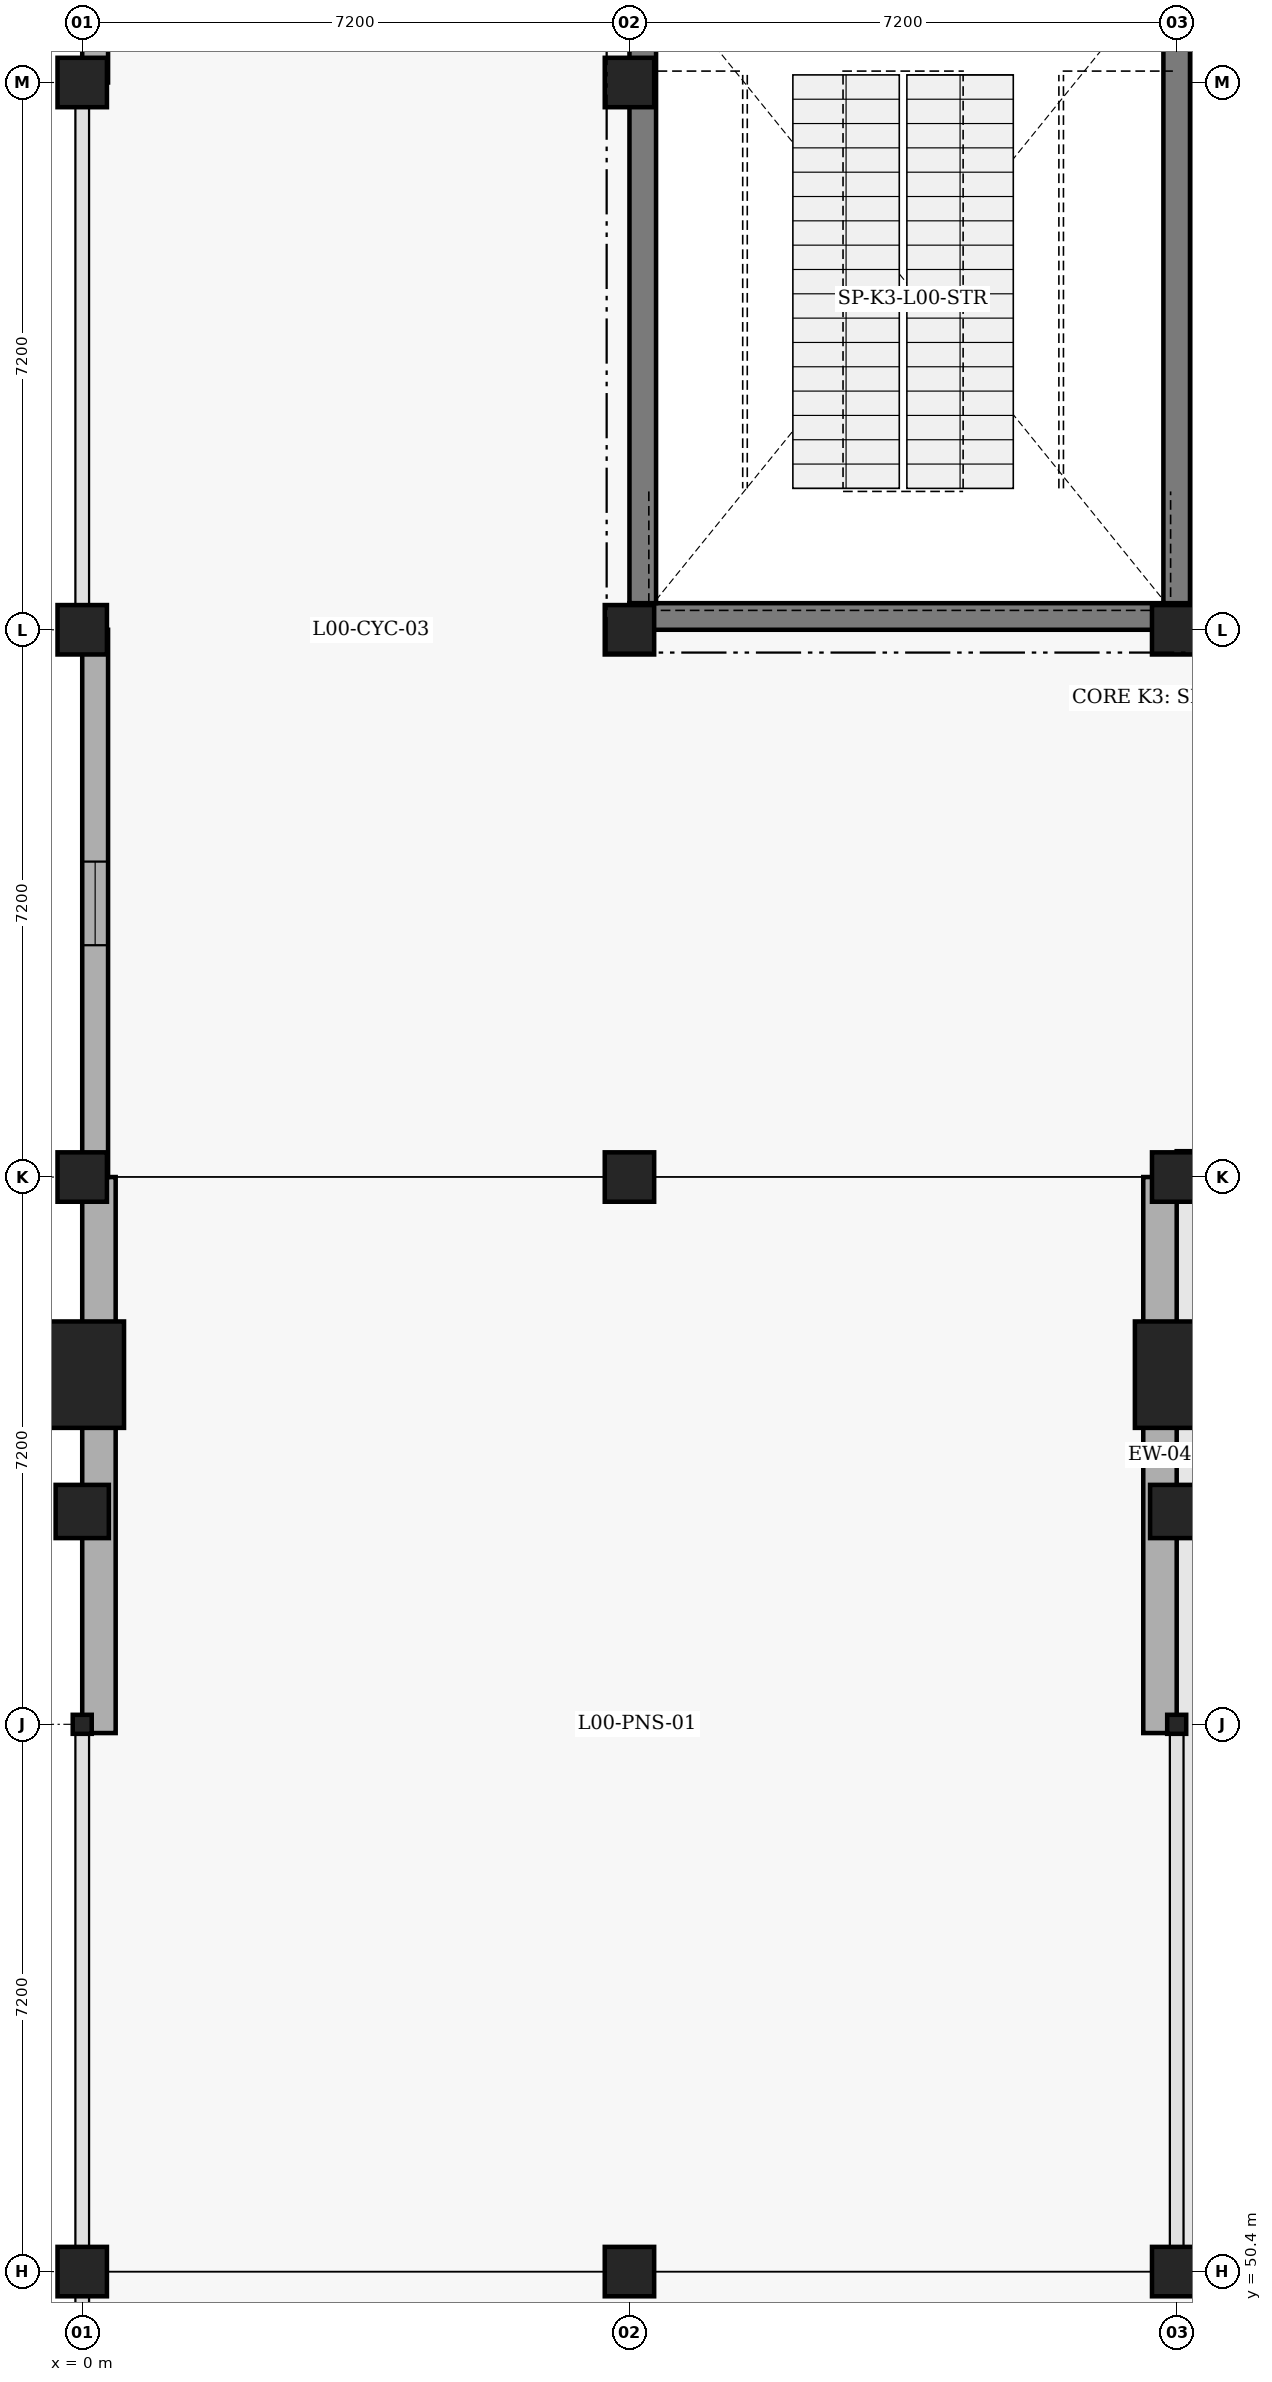
"""IFC4 building model, lengths in metres.
Left out: names, types, materials, properties, quantities, classifications, styles, units other than length and angle.
Written with IfcOpenShell. Run it as: python <this file> out.ifc"""

import sys

from ifc_helpers import new_model, si_unit, direction, frame, frame_2d, origin, origin_2d, place, context, subcontext, project, spatial, rectangle, hollow_rectangle, circle, extrude, element, fill, save


model = new_model("IFC4")
c1 = context("Model", 3, precision=1e-05, world=origin(), true_north=direction((0.0, 1.0)))
c2 = subcontext(c1, "Body", "Model", "MODEL_VIEW")
j1 = project(units=[si_unit("LENGTHUNIT", "METRE"), si_unit("PLANEANGLEUNIT", "RADIAN")], contexts=[c1])
p1 = place(None, origin())
s1 = spatial("IfcSite", under=j1, at=p1, CompositionType="ELEMENT")
p2 = place(p1, origin())
s2 = spatial("IfcBuilding", under=s1, at=p2, CompositionType="ELEMENT")
p3 = place(p2, origin())
s3 = spatial("IfcBuildingStorey", under=s2, at=p3, CompositionType="ELEMENT", Elevation=0.0)
p4 = place(p3, frame((21.6, 72.175, 0.0), z_axis=(0.0, 0.0, 1.0), x_axis=(-1.0, 0.0, 0.0)))
e1 = element("IfcWall", 1, at=p4, inside=s3, PredefinedType="SHEAR", context=c2, shape_type="SweptSolid", body=[
    extrude(rectangle(XDim=14.4, YDim=0.35, at=frame_2d((7.2, 0.0))), origin(), (0.0, 0.0, 1.0), 5.4),
])
p5 = place(p3, frame((7.375, 72.35, 0.0), z_axis=(0.0, 0.0, 1.0), x_axis=(0.0, 1.0, 0.0)))
e2 = element("IfcWall", 2, at=p5, inside=s3, PredefinedType="SHEAR", context=c2, shape_type="SweptSolid", body=[
    extrude(rectangle(XDim=13.7, YDim=0.35, at=frame_2d((6.85, 0.0))), origin(), (0.0, 0.0, 1.0), 5.4),
])
p6 = place(p5, frame((9.8, 0.0, 0.0)))
e3 = element("IfcOpeningElement", 3, at=p6, cuts=e2, PredefinedType="OPENING", context=c2, shape_type="SweptSolid", body=[
    extrude(rectangle(XDim=1.25, YDim=2.2, at=frame_2d((0.625, 1.1))), frame((0.0, 0.185, 0.0), z_axis=(0.0, -1.0, 0.0), x_axis=(1.0, 0.0, 0.0)), (0.0, 0.0, 1.0), 0.37),
])
p7 = place(p3, frame((14.4, 86.05, 0.0), z_axis=(0.0, 0.0, 1.0), x_axis=(0.0, -1.0, 0.0)))
e4 = element("IfcWall", 4, at=p7, inside=s3, PredefinedType="SHEAR", context=c2, shape_type="SweptSolid", body=[
    extrude(rectangle(XDim=13.7, YDim=0.35, at=frame_2d((6.85, 0.0))), origin(), (0.0, 0.0, 1.0), 5.4),
])
p8 = place(p7, frame((1.5, 0.0, 0.0)))
e5 = element("IfcOpeningElement", 5, at=p8, cuts=e4, PredefinedType="OPENING", context=c2, shape_type="SweptSolid", body=[
    extrude(rectangle(XDim=1.25, YDim=2.2, at=frame_2d((0.625, 1.1))), frame((0.0, 0.185, 0.0), z_axis=(0.0, -1.0, 0.0), x_axis=(1.0, 0.0, 0.0)), (0.0, 0.0, 1.0), 0.37),
])
p9 = place(p3, frame((0.0, 50.4, 0.0), z_axis=(0.0, 0.0, 1.0), x_axis=(1.0, 0.0, 0.0)))
e6 = element("IfcColumn", 6, at=p9, inside=s3, PredefinedType="COLUMN", context=c2, shape_type="SweptSolid", body=[
    extrude(rectangle(XDim=0.65, YDim=0.65, at=origin_2d()), origin(), (0.0, 0.0, 1.0), 5.4),
])
p10 = place(p3, frame((0.0, 57.6, 0.0), z_axis=(0.0, 0.0, 1.0), x_axis=(1.0, 0.0, 0.0)))
e7 = element("IfcColumn", 7, at=p10, inside=s3, PredefinedType="COLUMN", context=c2, shape_type="SweptSolid", body=[
    extrude(hollow_rectangle(XDim=0.25, YDim=0.25, WallThickness=0.012, at=origin_2d()), origin(), (0.0, 0.0, 1.0), 5.16),
])
p11 = place(p3, frame((0.0, 60.4, 0.0), z_axis=(0.0, 0.0, 1.0), x_axis=(1.0, 0.0, 0.0)))
e8 = element("IfcColumn", 8, at=p11, inside=s3, PredefinedType="COLUMN", context=c2, shape_type="SweptSolid", body=[
    extrude(circle(Radius=0.35, at=origin_2d()), origin(), (0.0, 0.0, 1.0), 5.4),
])
p12 = place(p3, frame((0.0, 62.2, 0.0), z_axis=(0.0, 0.0, 1.0), x_axis=(1.0, 0.0, 0.0)))
e9 = element("IfcColumn", 9, at=p12, inside=s3, PredefinedType="COLUMN", context=c2, shape_type="SweptSolid", body=[
    extrude(rectangle(XDim=1.1, YDim=1.4, at=origin_2d()), origin(), (0.0, 0.0, 1.0), 1.5),
])
for number, where, z_axis, x_axis in (
    (10, (0.0, 64.8, 0.0), (0.0, 0.0, 1.0), (1.0, 0.0, 0.0)),
    (11, (0.0, 72.0, 0.0), (0.0, 0.0, 1.0), (0.0, 1.0, 0.0)),
    (12, (0.0, 79.2, 0.0), (0.0, 0.0, 1.0), (0.0, 1.0, 0.0)),
):
    element("IfcColumn", number, at=place(p3, frame(where, z_axis=z_axis, x_axis=x_axis)), inside=s3, PredefinedType="COLUMN", context=c2, shape_type="SweptSolid", body=[
        extrude(rectangle(XDim=0.65, YDim=0.65, at=origin_2d()), origin(), (0.0, 0.0, 1.0), 5.12),
    ])
p13 = place(p3, frame((7.2, 50.4, 0.0), z_axis=(0.0, 0.0, 1.0), x_axis=(1.0, 0.0, 0.0)))
e13 = element("IfcColumn", 13, at=p13, inside=s3, PredefinedType="COLUMN", context=c2, shape_type="SweptSolid", body=[
    extrude(rectangle(XDim=0.65, YDim=0.65, at=origin_2d()), origin(), (0.0, 0.0, 1.0), 5.4),
])
p14 = place(p3, frame((7.2, 57.6, 0.0), z_axis=(0.0, 0.0, 1.0), x_axis=(1.0, 0.0, 0.0)))
e14 = element("IfcColumn", 14, at=p14, inside=s3, PredefinedType="COLUMN", context=c2, shape_type="SweptSolid", body=[
    extrude(hollow_rectangle(XDim=0.25, YDim=0.25, WallThickness=0.012, at=origin_2d()), origin(), (0.0, 0.0, 1.0), 5.16),
])
for number, where, z_axis, x_axis in (
    (15, (7.2, 64.8, 0.0), (0.0, 0.0, 1.0), (1.0, 0.0, 0.0)),
    (16, (7.2, 72.0, 0.0), (0.0, 0.0, 1.0), (1.0, 0.0, 0.0)),
    (17, (7.2, 79.2, 0.0), (0.0, 0.0, 1.0), (1.0, 0.0, 0.0)),
):
    element("IfcColumn", number, at=place(p3, frame(where, z_axis=z_axis, x_axis=x_axis)), inside=s3, PredefinedType="COLUMN", context=c2, shape_type="SweptSolid", body=[
        extrude(rectangle(XDim=0.65, YDim=0.65, at=origin_2d()), origin(), (0.0, 0.0, 1.0), 5.12),
    ])
p15 = place(p3, frame((14.4, 50.4, 0.0), z_axis=(0.0, 0.0, 1.0), x_axis=(1.0, 0.0, 0.0)))
e18 = element("IfcColumn", 18, at=p15, inside=s3, PredefinedType="COLUMN", context=c2, shape_type="SweptSolid", body=[
    extrude(rectangle(XDim=0.65, YDim=0.65, at=origin_2d()), origin(), (0.0, 0.0, 1.0), 5.4),
])
p16 = place(p3, frame((14.4, 57.6, 0.0), z_axis=(0.0, 0.0, 1.0), x_axis=(1.0, 0.0, 0.0)))
e19 = element("IfcColumn", 19, at=p16, inside=s3, PredefinedType="COLUMN", context=c2, shape_type="SweptSolid", body=[
    extrude(hollow_rectangle(XDim=0.25, YDim=0.25, WallThickness=0.012, at=origin_2d()), origin(), (0.0, 0.0, 1.0), 5.16),
])
p17 = place(p3, frame((14.4, 60.4, 0.0), z_axis=(0.0, 0.0, 1.0), x_axis=(1.0, 0.0, 0.0)))
e20 = element("IfcColumn", 20, at=p17, inside=s3, PredefinedType="COLUMN", context=c2, shape_type="SweptSolid", body=[
    extrude(circle(Radius=0.35, at=origin_2d()), origin(), (0.0, 0.0, 1.0), 5.4),
])
p18 = place(p3, frame((14.4, 62.2, 0.0), z_axis=(0.0, 0.0, 1.0), x_axis=(1.0, 0.0, 0.0)))
e21 = element("IfcColumn", 21, at=p18, inside=s3, PredefinedType="COLUMN", context=c2, shape_type="SweptSolid", body=[
    extrude(rectangle(XDim=1.1, YDim=1.4, at=origin_2d()), origin(), (0.0, 0.0, 1.0), 1.5),
])
for number, where, z_axis, x_axis in (
    (22, (14.4, 64.8, 0.0), (0.0, 0.0, 1.0), (1.0, 0.0, 0.0)),
    (23, (14.4, 72.0, 0.0), (0.0, 0.0, 1.0), (1.0, 0.0, 0.0)),
):
    element("IfcColumn", number, at=place(p3, frame(where, z_axis=z_axis, x_axis=x_axis)), inside=s3, PredefinedType="COLUMN", context=c2, shape_type="SweptSolid", body=[
        extrude(rectangle(XDim=0.65, YDim=0.65, at=origin_2d()), origin(), (0.0, 0.0, 1.0), 5.12),
    ])
p19 = place(p3, frame((0.22, 57.485, 0.0), z_axis=(0.0, 0.0, 1.0), x_axis=(0.0, 1.0, 0.0)))
e24 = element("IfcWall", 24, at=p19, inside=s3, PredefinedType="SOLIDWALL", context=c2, shape_type="SweptSolid", body=[
    extrude(rectangle(XDim=7.315, YDim=0.44, at=frame_2d((3.657, 0.0))), origin(), (0.0, 0.0, 1.0), 4.83),
])
p20 = place(p3, frame((0.17, 64.8, 0.0), z_axis=(0.0, 0.0, 1.0), x_axis=(0.0, 1.0, 0.0)))
e25 = element("IfcWall", 25, at=p20, inside=s3, PredefinedType="SOLIDWALL", context=c2, shape_type="SweptSolid", body=[
    extrude(rectangle(XDim=7.2, YDim=0.34, at=frame_2d((3.6, 0.0))), origin(), (0.0, 0.0, 1.0), 4.79),
])
p21 = place(p20, frame((3.05, 0.0, 0.9)))
e26 = element("IfcOpeningElement", 26, at=p21, cuts=e25, PredefinedType="OPENING", context=c2, shape_type="SweptSolid", body=[
    extrude(rectangle(XDim=1.1, YDim=1.2, at=frame_2d((0.55, 0.6))), frame((0.0, 0.18, 0.0), z_axis=(0.0, -1.0, 0.0), x_axis=(1.0, 0.0, 0.0)), (0.0, 0.0, 1.0), 0.36),
])
p22 = place(p3, frame((0.17, 79.2, 0.0), z_axis=(0.0, 0.0, 1.0), x_axis=(0.0, 1.0, 0.0)))
e27 = element("IfcWall", 27, at=p22, inside=s3, PredefinedType="SOLIDWALL", context=c2, shape_type="SweptSolid", body=[
    extrude(rectangle(XDim=7.2, YDim=0.34, at=frame_2d((3.6, 0.0))), origin(), (0.0, 0.0, 1.0), 4.79),
])
p23 = place(p22, frame((2.6, 0.0, 0.0)))
e28 = element("IfcOpeningElement", 28, at=p23, cuts=e27, PredefinedType="OPENING", context=c2, shape_type="SweptSolid", body=[
    extrude(rectangle(XDim=2.0, YDim=2.3, at=frame_2d((1.0, 1.15))), frame((0.0, 0.18, 0.0), z_axis=(0.0, -1.0, 0.0), x_axis=(1.0, 0.0, 0.0)), (0.0, 0.0, 1.0), 0.36),
])
p24 = place(p3, frame((21.6, 64.97, 0.0), z_axis=(0.0, 0.0, 1.0), x_axis=(-1.0, 0.0, 0.0)))
e29 = element("IfcWall", 29, at=p24, inside=s3, PredefinedType="SOLIDWALL", context=c2, shape_type="SweptSolid", body=[
    extrude(rectangle(XDim=7.2, YDim=0.34, at=frame_2d((3.6, 0.0))), origin(), (0.0, 0.0, 1.0), 4.82),
])
p25 = place(p24, frame((1.5, 0.0, 0.0)))
e30 = element("IfcOpeningElement", 30, at=p25, cuts=e29, PredefinedType="OPENING", context=c2, shape_type="SweptSolid", body=[
    extrude(rectangle(XDim=4.2, YDim=2.8, at=frame_2d((2.1, 1.4))), frame((0.0, 0.18, 0.0), z_axis=(0.0, -1.0, 0.0), x_axis=(1.0, 0.0, 0.0)), (0.0, 0.0, 1.0), 0.36),
])
p26 = place(p3, frame((14.18, 64.8, 0.0), z_axis=(0.0, 0.0, 1.0), x_axis=(0.0, -1.0, 0.0)))
e31 = element("IfcWall", 31, at=p26, inside=s3, PredefinedType="SOLIDWALL", context=c2, shape_type="SweptSolid", body=[
    extrude(rectangle(XDim=7.315, YDim=0.44, at=frame_2d((3.657, 0.0))), origin(), (0.0, 0.0, 1.0), 4.83),
])
p27 = place(p3, frame((14.58, 77.42, 0.0), z_axis=(0.0, 0.0, 1.0), x_axis=(1.0, 0.0, 0.0)))
e32 = element("IfcWall", 32, at=p27, inside=s3, PredefinedType="PARTITIONING", context=c2, shape_type="SweptSolid", body=[
    extrude(rectangle(XDim=6.67, YDim=0.19, at=frame_2d((3.335, 0.0))), origin(), (0.0, 0.0, 1.0), 5.05),
])
p28 = place(p21, origin())
e33 = element("IfcWindow", 33, at=p28, inside=s3, PartitioningType="SINGLE_PANEL", PredefinedType="WINDOW", context=c2, shape_type="SweptSolid", body=[
    extrude(rectangle(XDim=1.1, YDim=1.2, at=frame_2d((0.55, 0.6))), frame((0.0, 0.03, 0.0), z_axis=(0.0, -1.0, 0.0), x_axis=(1.0, 0.0, 0.0)), (0.0, 0.0, 1.0), 0.06),
])
fill(e26, e33)
save(model, sys.argv[1])
